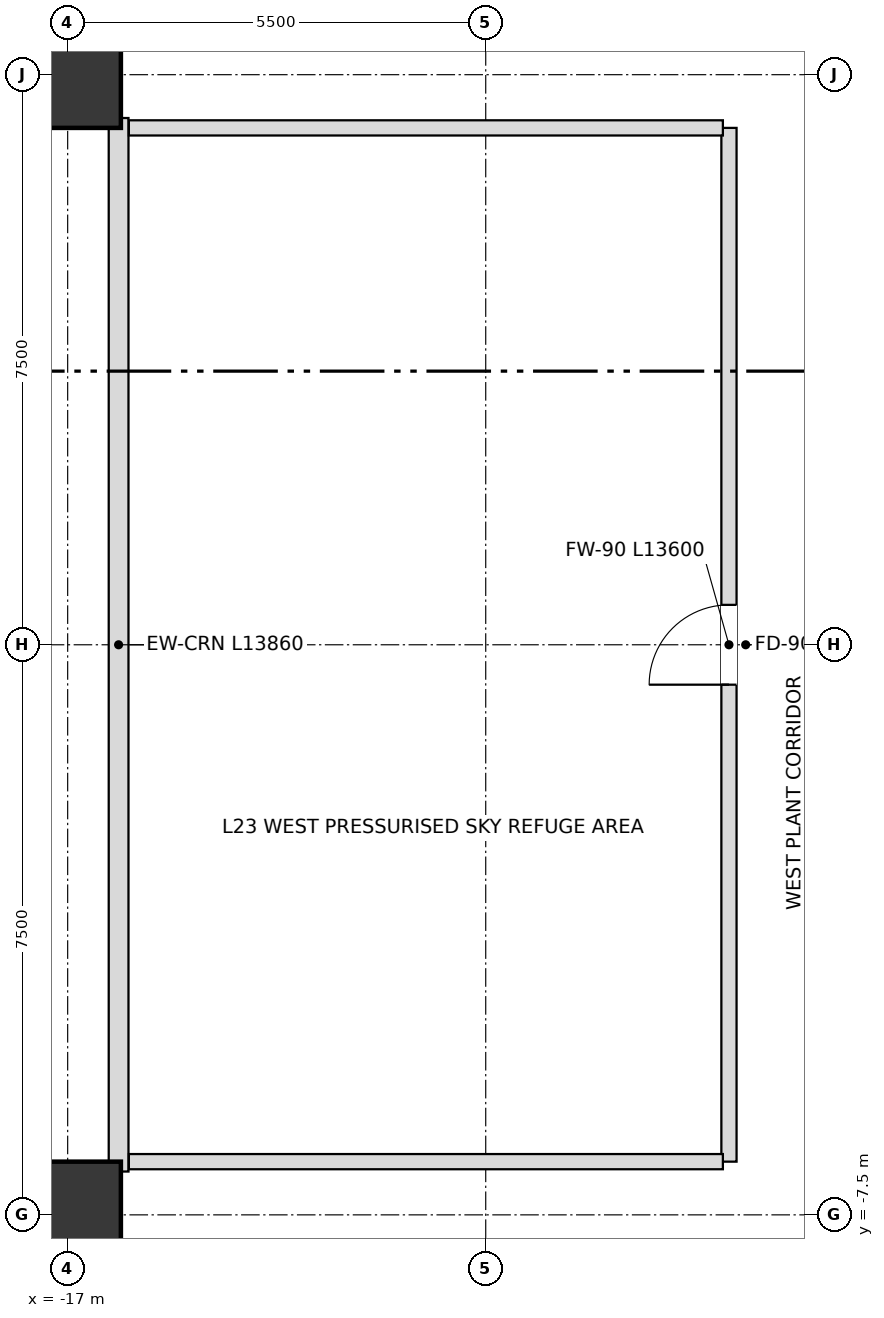
"""IFC4 building model, lengths in metres.
Left out: names, types, materials, properties, quantities, classifications, styles, units other than length and angle.
Written with IfcOpenShell. Run it as: python <this file> out.ifc"""

import sys

from ifc_helpers import new_model, si_unit, direction, frame, frame_2d, origin, origin_2d, place, context, subcontext, project, spatial, rectangle, extrude, element, fill, save


model = new_model("IFC4")
c1 = context("Model", 3, precision=1e-05, world=origin(), true_north=direction((0.0, 1.0)))
c2 = subcontext(c1, "Body", "Model", "MODEL_VIEW")
j1 = project(units=[si_unit("LENGTHUNIT", "METRE"), si_unit("PLANEANGLEUNIT", "RADIAN")], contexts=[c1])
p1 = place(None, origin())
s1 = spatial("IfcSite", under=j1, at=p1, CompositionType="ELEMENT")
p2 = place(p1, origin())
s2 = spatial("IfcBuilding", under=s1, at=p2, CompositionType="ELEMENT")
p3 = place(p2, frame((0.0, 0.0, 93.6)))
s3 = spatial("IfcBuildingStorey", under=s2, at=p3, CompositionType="ELEMENT", Elevation=93.6)
for number, where, z_axis, x_axis in (
    (1, (-17.0, 7.5, 0.0), (0.0, 0.0, 1.0), (1.0, 0.0, 0.0)),
    (2, (-17.0, -7.5, 0.0), (0.0, 0.0, 1.0), (1.0, 0.0, 0.0)),
):
    element("IfcColumn", number, at=place(p3, frame(where, z_axis=z_axis, x_axis=x_axis)), inside=s3, PredefinedType="USERDEFINED", context=c2, shape_type="SweptSolid", body=[
        extrude(rectangle(XDim=1.4, YDim=1.4, at=origin_2d()), origin(), (0.0, 0.0, 1.0), 5.4),
    ])
p4 = place(p3, frame((-16.33, -6.93, 0.0), z_axis=(0.0, 0.0, 1.0), x_axis=(0.0, 1.0, 0.0)))
e3 = element("IfcWall", 3, at=p4, inside=s3, PredefinedType="SOLIDWALL", context=c2, shape_type="SweptSolid", body=[
    extrude(rectangle(XDim=13.86, YDim=0.26, at=frame_2d((6.93, 0.0))), origin(), (0.0, 0.0, 1.0), 5.1),
])
p5 = place(p3, frame((-8.3, -6.8, 0.0), z_axis=(0.0, 0.0, 1.0), x_axis=(0.0, 1.0, 0.0)))
e4 = element("IfcWall", 4, at=p5, inside=s3, PredefinedType="SOLIDWALL", context=c2, shape_type="SweptSolid", body=[
    extrude(rectangle(XDim=13.6, YDim=0.2, at=frame_2d((6.8, 0.0))), origin(), (0.0, 0.0, 1.0), 5.1),
])
p6 = place(p5, frame((6.275, 0.0, 0.0)))
e5 = element("IfcOpeningElement", 5, at=p6, cuts=e4, PredefinedType="OPENING", context=c2, shape_type="SweptSolid", body=[
    extrude(rectangle(XDim=1.05, YDim=2.15, at=frame_2d((0.525, 1.075))), frame((0.0, 0.11, 0.0), z_axis=(0.0, -1.0, 0.0), x_axis=(1.0, 0.0, 0.0)), (0.0, 0.0, 1.0), 0.22),
])
for number, where, z_axis, x_axis in (
    (6, (-16.195, -6.8, 0.0), (0.0, 0.0, 1.0), (1.0, 0.0, 0.0)),
    (7, (-16.195, 6.8, 0.0), (0.0, 0.0, 1.0), (1.0, 0.0, 0.0)),
):
    element("IfcWall", number, at=place(p3, frame(where, z_axis=z_axis, x_axis=x_axis)), inside=s3, PredefinedType="SOLIDWALL", context=c2, shape_type="SweptSolid", body=[
        extrude(rectangle(XDim=7.815, YDim=0.2, at=frame_2d((3.908, 0.0))), origin(), (0.0, 0.0, 1.0), 5.1),
    ])
p7 = place(p6, origin())
e8 = element("IfcDoor", 8, at=p7, inside=s3, OperationType="SINGLE_SWING_LEFT", PredefinedType="DOOR", context=c2, shape_type="SweptSolid", body=[
    extrude(rectangle(XDim=1.05, YDim=2.15, at=frame_2d((0.525, 1.075))), frame((0.0, 0.025, 0.0), z_axis=(0.0, -1.0, 0.0), x_axis=(1.0, 0.0, 0.0)), (0.0, 0.0, 1.0), 0.05),
])
fill(e5, e8)
save(model, sys.argv[1])
